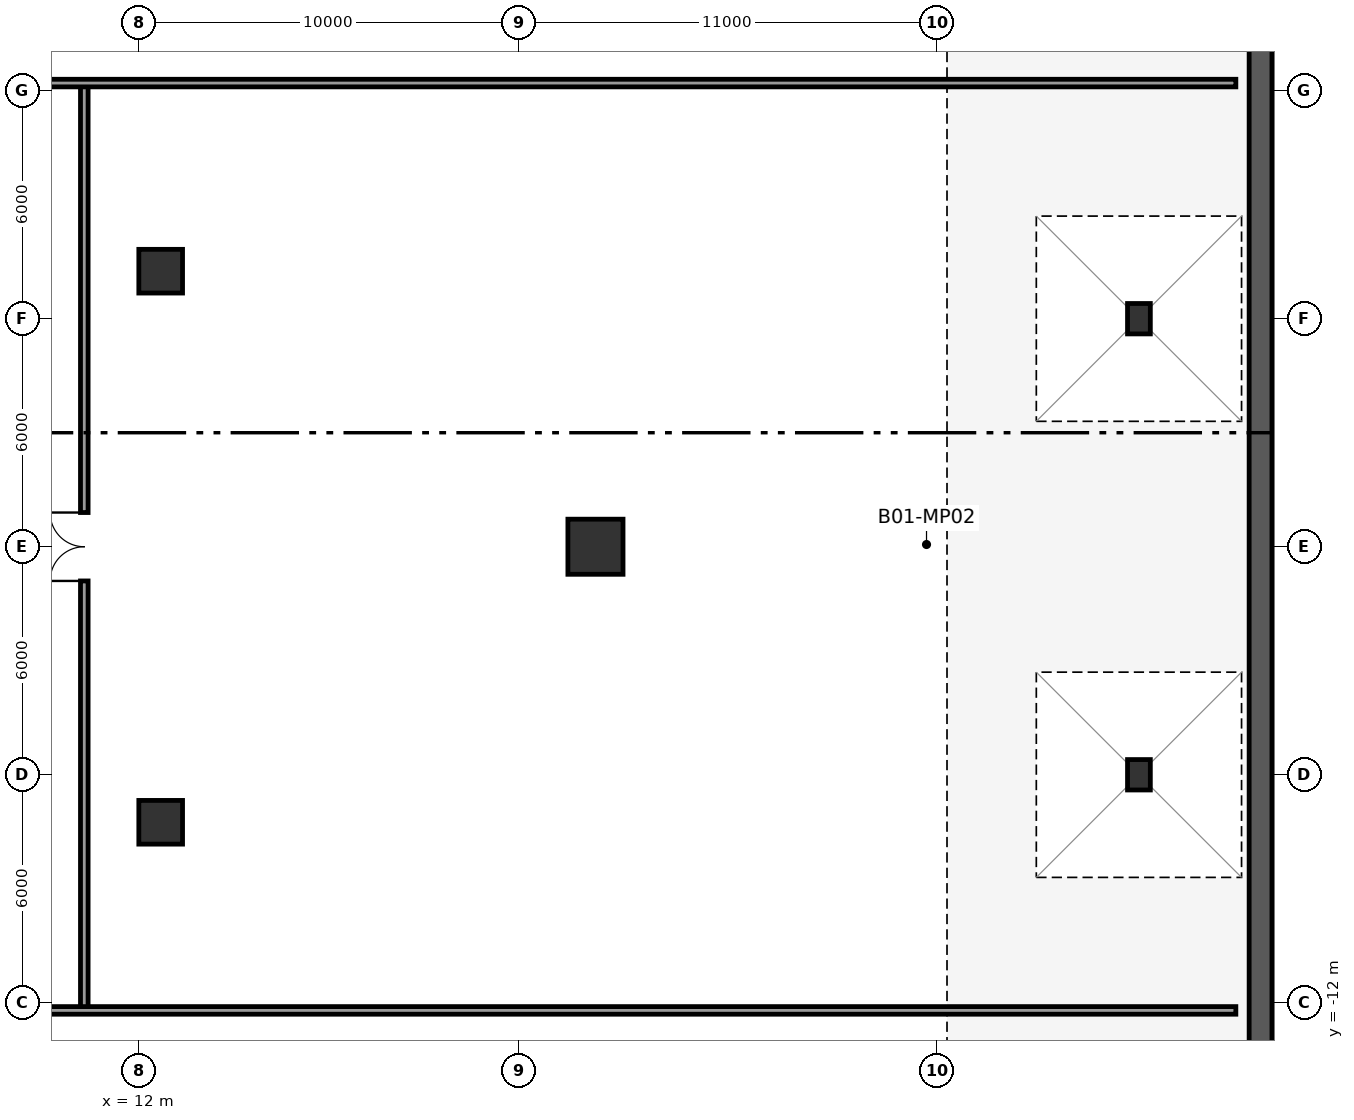
"""IFC4 building model, lengths in metres.
Left out: names, types, materials, properties, quantities, classifications, styles, units other than length and angle.
Written with IfcOpenShell. Run it as: python <this file> out.ifc"""

import sys

from ifc_helpers import new_model, si_unit, direction, frame, frame_2d, origin, origin_2d, place, context, subcontext, project, spatial, rectangle, hollow_rectangle, extrude, element, fill, save


model = new_model("IFC4")
c1 = context("Model", 3, precision=1e-05, world=origin(), true_north=direction((0.0, 1.0)))
c2 = subcontext(c1, "Body", "Model", "MODEL_VIEW")
j1 = project(units=[si_unit("LENGTHUNIT", "METRE"), si_unit("PLANEANGLEUNIT", "RADIAN")], contexts=[c1])
p1 = place(None, origin())
s1 = spatial("IfcSite", under=j1, at=p1, CompositionType="ELEMENT")
p2 = place(p1, origin())
s2 = spatial("IfcBuilding", under=s1, at=p2, CompositionType="ELEMENT")
p3 = place(p2, frame((0.0, 0.0, -5.4)))
s3 = spatial("IfcBuildingStorey", under=s2, at=p3, CompositionType="ELEMENT", Elevation=-5.4)
p4 = place(p3, frame((41.5, -30.5, 0.0), z_axis=(0.0, 0.0, 1.0), x_axis=(0.0, 1.0, 0.0)))
e1 = element("IfcWall", 1, at=p4, inside=s3, PredefinedType="SHEAR", context=c2, shape_type="SweptSolid", body=[
    extrude(rectangle(XDim=61.0, YDim=0.6, at=frame_2d((30.5, 0.0))), origin(), (0.0, 0.0, 1.0), 5.1),
])
for number, where, z_axis, x_axis in (
    (2, (12.56, -7.25, 0.0), (0.0, 0.0, 1.0), (1.0, 0.0, 0.0)),
    (3, (12.56, 7.25, 0.0), (0.0, 0.0, 1.0), (1.0, 0.0, 0.0)),
):
    element("IfcColumn", number, at=place(p3, frame(where, z_axis=z_axis, x_axis=x_axis)), inside=s3, PredefinedType="COLUMN", context=c2, shape_type="SweptSolid", body=[
        extrude(rectangle(XDim=1.15, YDim=1.15, at=origin_2d()), origin(), (0.0, 0.0, 1.0), 5.4),
    ])
p5 = place(p3, frame((24.0, 0.0, 0.0), z_axis=(0.0, 0.0, 1.0), x_axis=(1.0, 0.0, 0.0)))
e4 = element("IfcColumn", 4, at=p5, inside=s3, PredefinedType="COLUMN", context=c2, shape_type="SweptSolid", body=[
    extrude(rectangle(XDim=1.45, YDim=1.45, at=origin_2d()), origin(), (0.0, 0.0, 1.0), 5.4),
])
for number, where, z_axis, x_axis in (
    (5, (38.3, -6.0, 0.0), (0.0, 0.0, 1.0), (1.0, 0.0, 0.0)),
    (6, (38.3, 6.0, 0.0), (0.0, 0.0, 1.0), (1.0, 0.0, 0.0)),
):
    element("IfcColumn", number, at=place(p3, frame(where, z_axis=z_axis, x_axis=x_axis)), inside=s3, PredefinedType="COLUMN", context=c2, shape_type="SweptSolid", body=[
        extrude(hollow_rectangle(XDim=0.6, YDim=0.8, WallThickness=0.05, at=origin_2d()), origin(), (0.0, 0.0, 1.0), 5.4),
    ])
p6 = place(p3, frame((10.55, -12.2, 0.0), z_axis=(0.0, 0.0, 1.0), x_axis=(0.0, 1.0, 0.0)))
e7 = element("IfcWall", 7, at=p6, inside=s3, PredefinedType="PARTITIONING", context=c2, shape_type="SweptSolid", body=[
    extrude(rectangle(XDim=24.4, YDim=0.2, at=frame_2d((12.2, 0.0))), origin(), (0.0, 0.0, 1.0), 5.1),
])
p7 = place(p6, frame((11.3, 0.0, 0.0)))
e8 = element("IfcOpeningElement", 8, at=p7, cuts=e7, PredefinedType="OPENING", context=c2, shape_type="SweptSolid", body=[
    extrude(rectangle(XDim=1.8, YDim=2.2, at=frame_2d((0.9, 1.1))), frame((0.0, 0.11, 0.0), z_axis=(0.0, -1.0, 0.0), x_axis=(1.0, 0.0, 0.0)), (0.0, 0.0, 1.0), 0.22),
])
p8 = place(p3, frame((-40.85, 12.2, 0.0), z_axis=(0.0, 0.0, 1.0), x_axis=(1.0, 0.0, 0.0)))
e9 = element("IfcWall", 9, at=p8, inside=s3, PredefinedType="PARTITIONING", context=c2, shape_type="SweptSolid", body=[
    extrude(rectangle(XDim=81.7, YDim=0.2, at=frame_2d((40.85, 0.0))), origin(), (0.0, 0.0, 1.0), 5.1),
])
p9 = place(p8, frame((17.074, 0.0, 0.0)))
e10 = element("IfcOpeningElement", 10, at=p9, cuts=e9, PredefinedType="OPENING", context=c2, shape_type="SweptSolid", body=[
    extrude(rectangle(XDim=1.8, YDim=2.2, at=frame_2d((0.9, 1.1))), frame((0.0, 0.11, 0.0), z_axis=(0.0, -1.0, 0.0), x_axis=(1.0, 0.0, 0.0)), (0.0, 0.0, 1.0), 0.22),
])
p10 = place(p3, frame((-40.85, -12.2, 0.0), z_axis=(0.0, 0.0, 1.0), x_axis=(1.0, 0.0, 0.0)))
e11 = element("IfcWall", 11, at=p10, inside=s3, PredefinedType="PARTITIONING", context=c2, shape_type="SweptSolid", body=[
    extrude(rectangle(XDim=81.7, YDim=0.2, at=frame_2d((40.85, 0.0))), origin(), (0.0, 0.0, 1.0), 5.1),
])
p11 = place(p10, frame((17.074, 0.0, 0.0)))
e12 = element("IfcOpeningElement", 12, at=p11, cuts=e11, PredefinedType="OPENING", context=c2, shape_type="SweptSolid", body=[
    extrude(rectangle(XDim=1.8, YDim=2.2, at=frame_2d((0.9, 1.1))), frame((0.0, 0.11, 0.0), z_axis=(0.0, -1.0, 0.0), x_axis=(1.0, 0.0, 0.0)), (0.0, 0.0, 1.0), 0.22),
])
p12 = place(p7, origin())
e13 = element("IfcDoor", 13, at=p12, inside=s3, OperationType="DOUBLE_DOOR_SINGLE_SWING", PredefinedType="DOOR", context=c2, shape_type="SweptSolid", body=[
    extrude(rectangle(XDim=1.8, YDim=2.2, at=frame_2d((0.9, 1.1))), frame((0.0, 0.025, 0.0), z_axis=(0.0, -1.0, 0.0), x_axis=(1.0, 0.0, 0.0)), (0.0, 0.0, 1.0), 0.05),
])
fill(e8, e13)
save(model, sys.argv[1])
